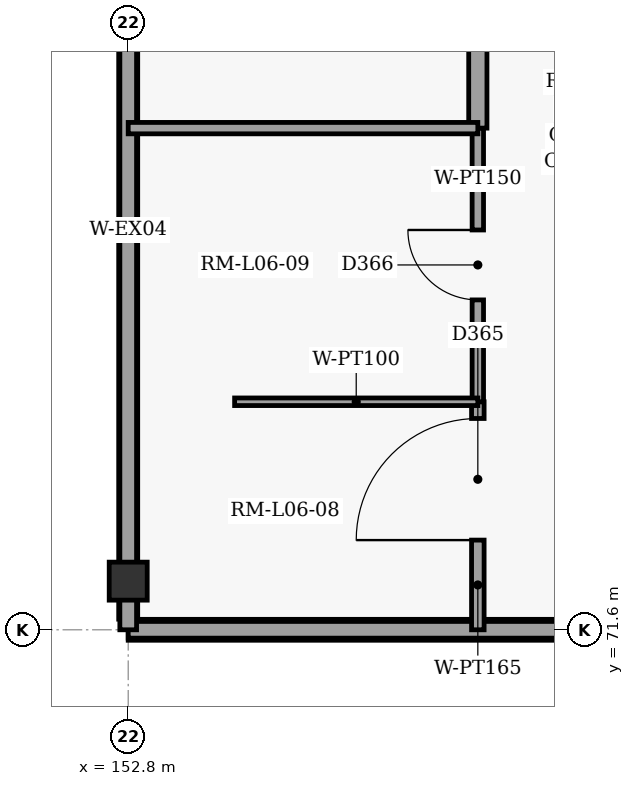
"""IFC4 building model, lengths in metres.
Left out: names, types, materials, properties, quantities, classifications, styles, units other than length and angle.
Written with IfcOpenShell. Run it as: python <this file> out.ifc"""

import sys

from ifc_helpers import new_model, si_unit, direction, frame, frame_2d, origin, origin_2d, place, context, subcontext, project, spatial, rectangle, extrude, element, fill, save


model = new_model("IFC4")
c1 = context("Model", 3, precision=1e-05, world=origin(), true_north=direction((0.0, 1.0)))
c2 = subcontext(c1, "Body", "Model", "MODEL_VIEW")
j1 = project(units=[si_unit("LENGTHUNIT", "METRE"), si_unit("PLANEANGLEUNIT", "RADIAN")], contexts=[c1])
p1 = place(None, origin())
s1 = spatial("IfcSite", under=j1, at=p1, CompositionType="ELEMENT")
p2 = place(p1, origin())
s2 = spatial("IfcBuilding", under=s1, at=p2, CompositionType="ELEMENT")
p3 = place(p2, frame((0.0, 0.0, 29.4)))
s3 = spatial("IfcBuildingStorey", under=s2, at=p3, CompositionType="ELEMENT", Elevation=29.4)
p4 = place(p3, frame((152.8, 72.24, 0.0), z_axis=(0.0, 0.0, 1.0), x_axis=(1.0, 0.0, 0.0)))
e1 = element("IfcColumn", 1, at=p4, inside=s3, PredefinedType="COLUMN", context=c2, shape_type="SweptSolid", body=[
    extrude(rectangle(XDim=0.5, YDim=0.5, at=origin_2d()), origin(), (0.0, 0.0, 1.0), 4.5),
])
p5 = place(p3, frame((172.0, 71.6, 0.0), z_axis=(0.0, 0.0, 1.0), x_axis=(-1.0, 0.0, 0.0)))
e2 = element("IfcWall", 2, at=p5, inside=s3, PredefinedType="SOLIDWALL", context=c2, shape_type="SweptSolid", body=[
    extrude(rectangle(XDim=19.2, YDim=0.275, at=frame_2d((9.6, 0.0))), origin(), (0.0, 0.0, 1.0), 4.255),
])
p6 = place(p5, frame((10.0, 0.0, 0.8)))
e3 = element("IfcOpeningElement", 3, at=p6, cuts=e2, PredefinedType="OPENING", context=c2, shape_type="SweptSolid", body=[
    extrude(rectangle(XDim=3.35, YDim=2.9, at=frame_2d((1.675, 1.45))), frame((0.0, 0.147, 0.0), z_axis=(0.0, -1.0, 0.0), x_axis=(1.0, 0.0, 0.0)), (0.0, 0.0, 1.0), 0.295),
])
p7 = place(p3, frame((152.8, 71.74, 0.0), z_axis=(0.0, 0.0, 1.0), x_axis=(0.0, 1.0, 0.0)))
e4 = element("IfcWall", 4, at=p7, inside=s3, PredefinedType="SOLIDWALL", context=c2, shape_type="SweptSolid", body=[
    extrude(rectangle(XDim=46.12, YDim=0.25, at=frame_2d((23.06, 0.0))), origin(), (0.0, 0.0, 1.0), 3.405),
])
p8 = place(p3, frame((172.0, 71.6, 4.5), z_axis=(0.0, 0.0, 1.0), x_axis=(-1.0, 0.0, 0.0)))
e5 = element("IfcWall", 5, at=p8, inside=s3, PredefinedType="PARAPET", context=c2, shape_type="SweptSolid", body=[
    extrude(rectangle(XDim=19.2, YDim=0.22, at=frame_2d((9.6, 0.0))), origin(), (0.0, 0.0, 1.0), 0.95),
])
p9 = place(p3, frame((152.8, 71.6, 4.5), z_axis=(0.0, 0.0, 1.0), x_axis=(0.0, 1.0, 0.0)))
e6 = element("IfcWall", 6, at=p9, inside=s3, PredefinedType="PARAPET", context=c2, shape_type="SweptSolid", body=[
    extrude(rectangle(XDim=46.4, YDim=0.22, at=frame_2d((23.2, 0.0))), origin(), (0.0, 0.0, 1.0), 0.95),
])
p10 = place(p3, frame((157.4, 71.6, 0.0), z_axis=(0.0, 0.0, 1.0), x_axis=(0.0, 1.0, 0.0)))
e7 = element("IfcWall", 7, at=p10, inside=s3, PredefinedType="PARTITIONING", context=c2, shape_type="SweptSolid", body=[
    extrude(rectangle(XDim=3.0, YDim=0.165, at=frame_2d((1.5, 0.0))), origin(), (0.0, 0.0, 1.0), 4.255),
])
p11 = place(p10, frame((1.18, 0.0, 0.0)))
e8 = element("IfcOpeningElement", 8, at=p11, cuts=e7, PredefinedType="OPENING", context=c2, shape_type="SweptSolid", body=[
    extrude(rectangle(XDim=1.6, YDim=2.3, at=frame_2d((0.8, 1.15))), frame((0.0, 0.093, 0.0), z_axis=(0.0, -1.0, 0.0), x_axis=(1.0, 0.0, 0.0)), (0.0, 0.0, 1.0), 0.185),
])
p12 = place(p3, frame((157.4, 74.6, 0.0), z_axis=(0.0, 0.0, 1.0), x_axis=(0.0, 1.0, 0.0)))
e9 = element("IfcWall", 9, at=p12, inside=s3, PredefinedType="PARTITIONING", context=c2, shape_type="SweptSolid", body=[
    extrude(rectangle(XDim=3.6, YDim=0.15, at=frame_2d((1.8, 0.0))), origin(), (0.0, 0.0, 1.0), 4.255),
])
p13 = place(p12, frame((1.34, 0.0, 0.0)))
e10 = element("IfcOpeningElement", 10, at=p13, cuts=e9, PredefinedType="OPENING", context=c2, shape_type="SweptSolid", body=[
    extrude(rectangle(XDim=0.92, YDim=2.1, at=frame_2d((0.46, 1.05))), frame((0.0, 0.085, 0.0), z_axis=(0.0, -1.0, 0.0), x_axis=(1.0, 0.0, 0.0)), (0.0, 0.0, 1.0), 0.17),
])
p14 = place(p3, frame((157.4, 78.2, 0.0), z_axis=(0.0, 0.0, 1.0), x_axis=(0.0, 1.0, 0.0)))
e11 = element("IfcWall", 11, at=p14, inside=s3, PredefinedType="PARTITIONING", context=c2, shape_type="SweptSolid", body=[
    extrude(rectangle(XDim=19.8, YDim=0.24, at=frame_2d((9.9, 0.0))), origin(), (0.0, 0.0, 1.0), 4.255),
])
p15 = place(p14, frame((9.4, 0.0, 0.0)))
e12 = element("IfcOpeningElement", 12, at=p15, cuts=e11, PredefinedType="OPENING", context=c2, shape_type="SweptSolid", body=[
    extrude(rectangle(XDim=1.0, YDim=2.1, at=frame_2d((0.5, 1.05))), frame((0.0, 0.13, 0.0), z_axis=(0.0, -1.0, 0.0), x_axis=(1.0, 0.0, 0.0)), (0.0, 0.0, 1.0), 0.26),
])
p16 = place(p3, frame((154.2, 74.6, 0.0), z_axis=(0.0, 0.0, 1.0), x_axis=(1.0, 0.0, 0.0)))
e13 = element("IfcWall", 13, at=p16, inside=s3, PredefinedType="PARTITIONING", context=c2, shape_type="SweptSolid", body=[
    extrude(rectangle(XDim=3.2, YDim=0.1, at=frame_2d((1.6, 0.0))), origin(), (0.0, 0.0, 1.0), 4.255),
])
p17 = place(p3, frame((152.8, 78.2, 0.0), z_axis=(0.0, 0.0, 1.0), x_axis=(1.0, 0.0, 0.0)))
e14 = element("IfcWall", 14, at=p17, inside=s3, PredefinedType="PARTITIONING", context=c2, shape_type="SweptSolid", body=[
    extrude(rectangle(XDim=4.6, YDim=0.15, at=frame_2d((2.3, 0.0))), origin(), (0.0, 0.0, 1.0), 4.255),
])
p18 = place(p11, origin())
e15 = element("IfcDoor", 15, at=p18, inside=s3, OperationType="SINGLE_SWING_LEFT", PredefinedType="DOOR", context=c2, shape_type="SweptSolid", body=[
    extrude(rectangle(XDim=1.6, YDim=2.3, at=frame_2d((0.8, 1.15))), frame((0.0, 0.025, 0.0), z_axis=(0.0, -1.0, 0.0), x_axis=(1.0, 0.0, 0.0)), (0.0, 0.0, 1.0), 0.05),
])
fill(e8, e15)
p19 = place(p13, origin())
e16 = element("IfcDoor", 16, at=p19, inside=s3, OperationType="SINGLE_SWING_RIGHT", PredefinedType="DOOR", context=c2, shape_type="SweptSolid", body=[
    extrude(rectangle(XDim=0.92, YDim=2.1, at=frame_2d((0.46, 1.05))), frame((0.0, 0.025, 0.0), z_axis=(0.0, -1.0, 0.0), x_axis=(1.0, 0.0, 0.0)), (0.0, 0.0, 1.0), 0.05),
])
fill(e10, e16)
save(model, sys.argv[1])
